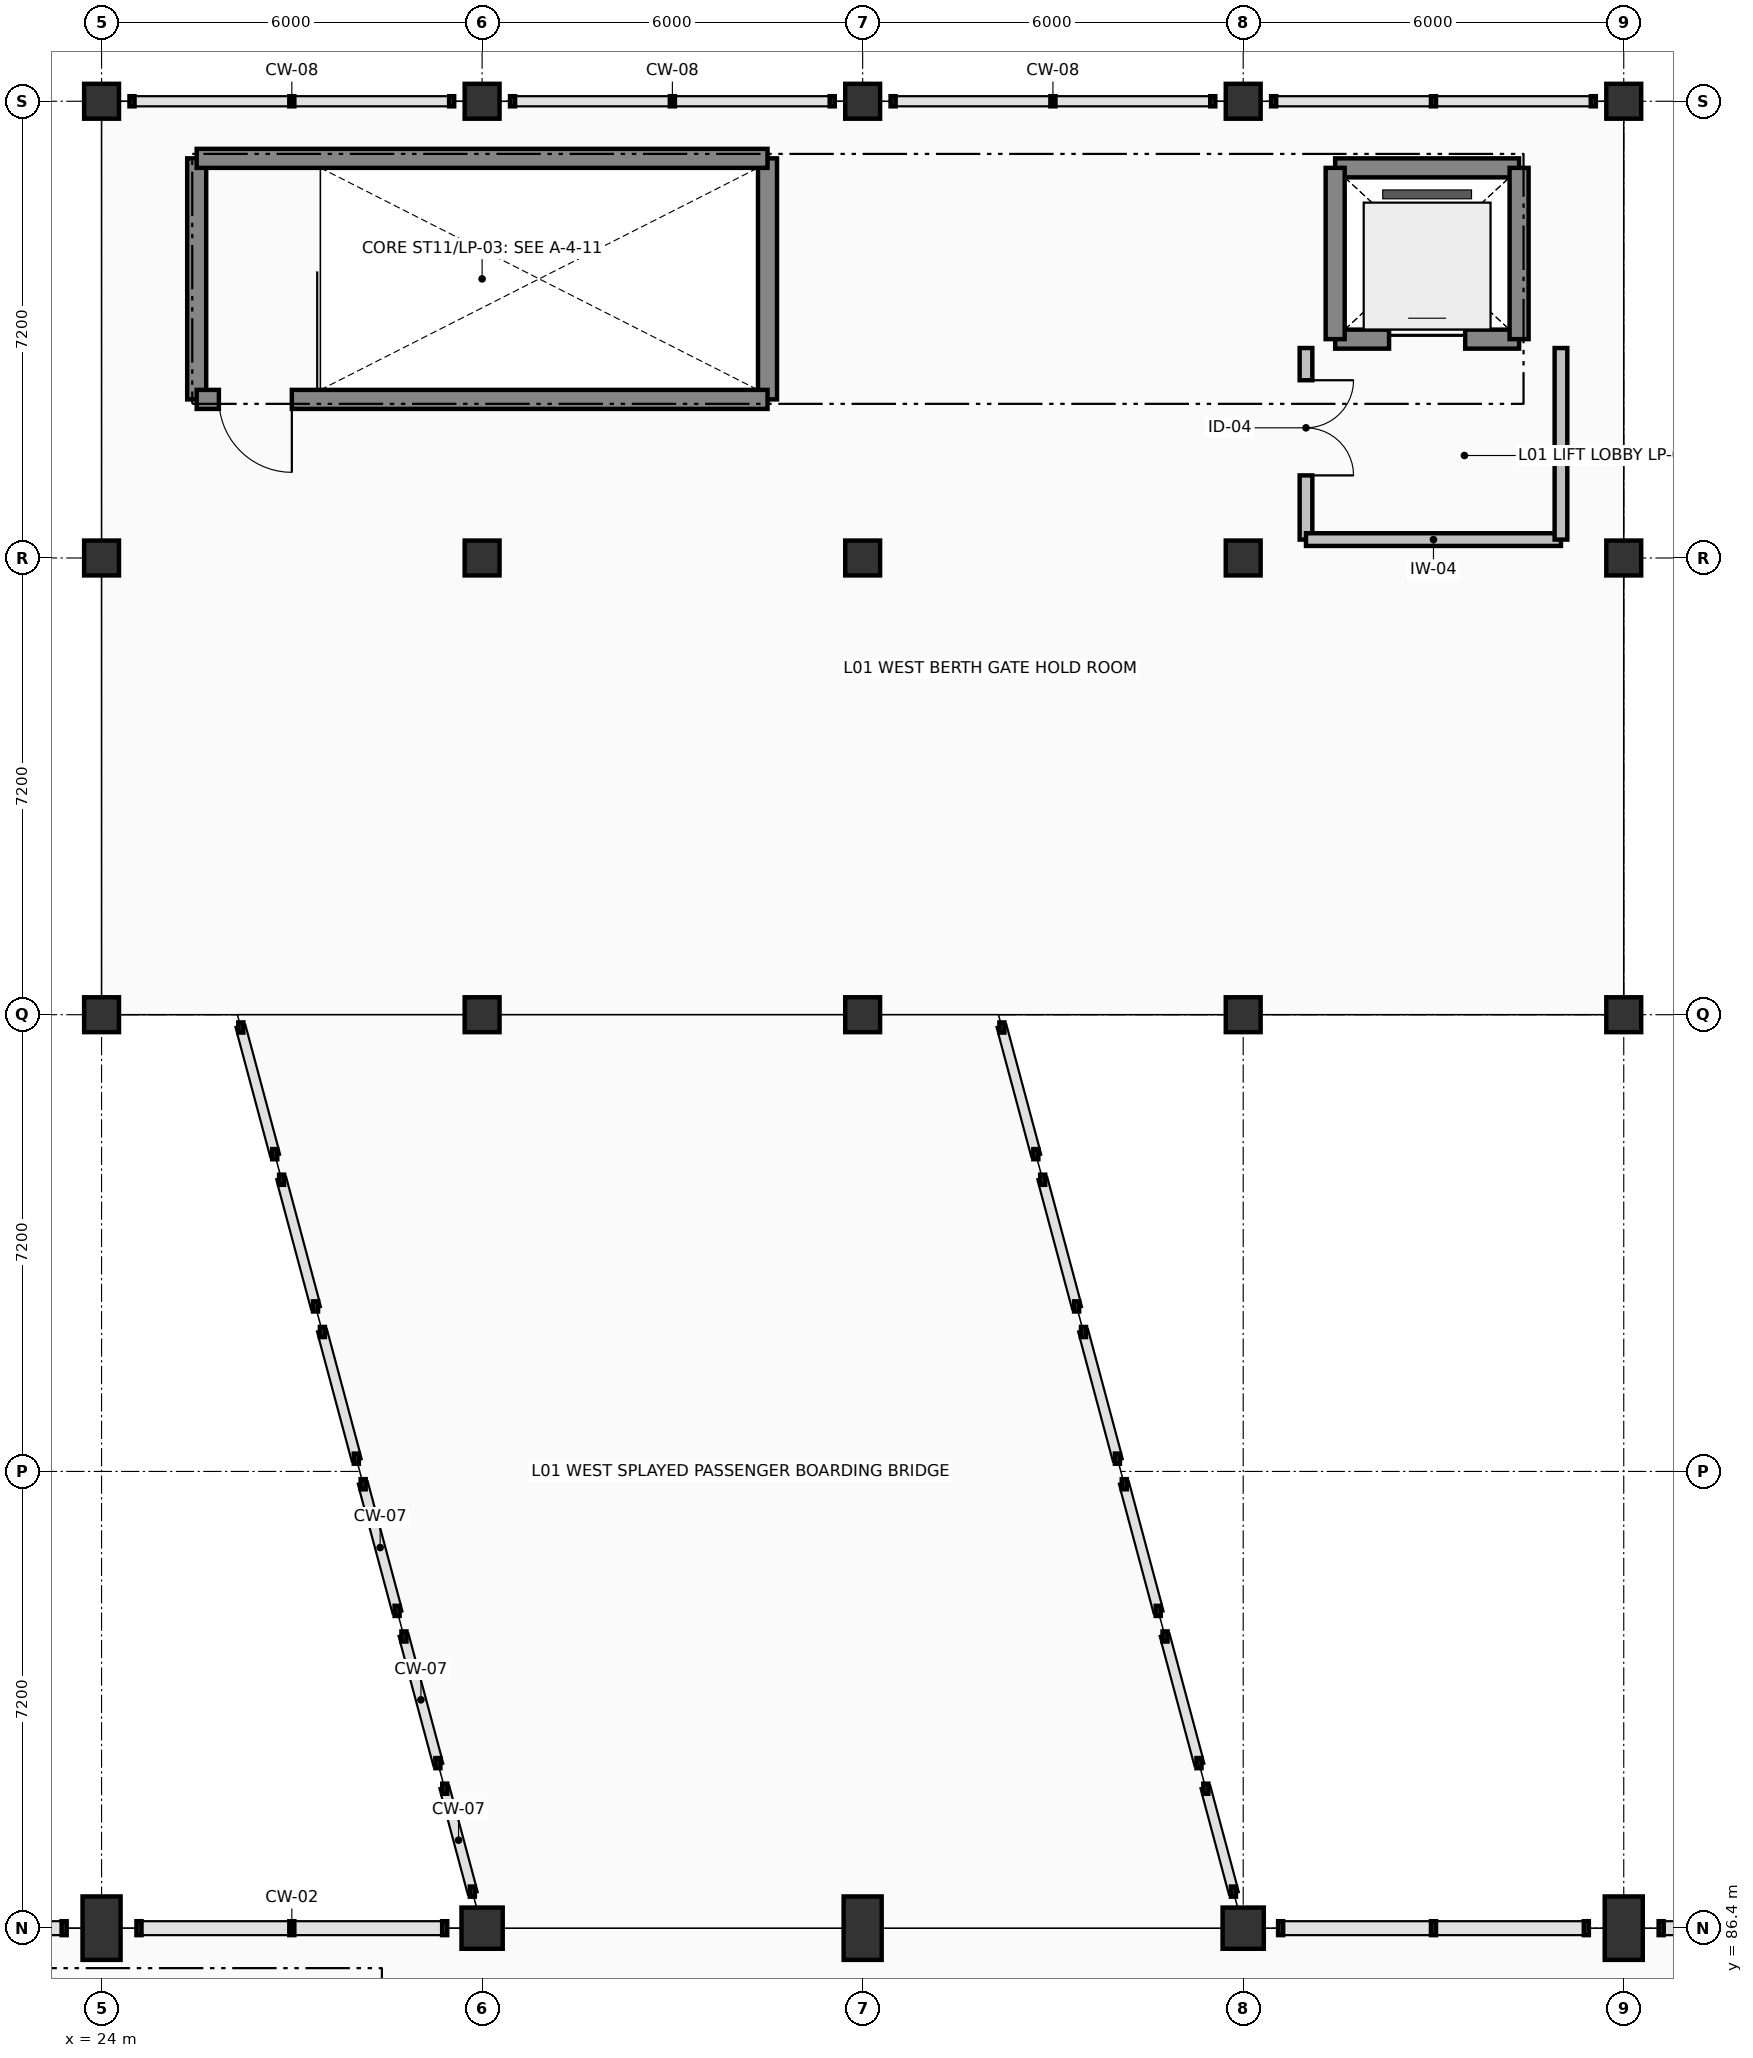
"""IFC4 building model, lengths in metres.
Left out: names, types, materials, properties, quantities, classifications, styles, units other than length and angle.
Written with IfcOpenShell. Run it as: python <this file> out.ifc"""

import sys

from ifc_helpers import new_model, si_unit, direction, frame, frame_2d, origin, origin_2d, place, context, subcontext, project, spatial, rectangle, extrude, element, fill, save


model = new_model("IFC4")
c1 = context("Model", 3, precision=1e-05, world=origin(), true_north=direction((0.0, 1.0)))
c2 = subcontext(c1, "Body", "Model", "MODEL_VIEW")
j1 = project(units=[si_unit("LENGTHUNIT", "METRE"), si_unit("PLANEANGLEUNIT", "RADIAN")], contexts=[c1])
p1 = place(None, origin())
s1 = spatial("IfcSite", under=j1, at=p1, CompositionType="ELEMENT")
p2 = place(p1, origin())
s2 = spatial("IfcBuilding", under=s1, at=p2, CompositionType="ELEMENT")
p3 = place(p2, frame((0.0, 0.0, 5.76)))
s3 = spatial("IfcBuildingStorey", under=s2, at=p3, CompositionType="ELEMENT", Elevation=5.76)
for number, where, z_axis, x_axis in (
    (1, (25.5, 110.5, 0.0), (0.0, 0.0, 1.0), (0.0, 1.0, 0.0)),
    (2, (34.5, 110.5, 0.0), (0.0, 0.0, 1.0), (0.0, 1.0, 0.0)),
):
    element("IfcWall", number, at=place(p3, frame(where, z_axis=z_axis, x_axis=x_axis)), inside=s3, PredefinedType="SHEAR", context=c2, shape_type="SweptSolid", body=[
        extrude(rectangle(XDim=3.8, YDim=0.3, at=frame_2d((1.9, 0.0))), origin(), (0.0, 0.0, 1.0), 3.78),
    ])
p4 = place(p3, frame((24.0, 86.4, 0.0), z_axis=(0.0, 0.0, 1.0), x_axis=(1.0, 0.0, 0.0)))
e3 = element("IfcColumn", 3, at=p4, inside=s3, PredefinedType="COLUMN", context=c2, shape_type="SweptSolid", body=[
    extrude(rectangle(XDim=0.6, YDim=1.0, at=origin_2d()), origin(), (0.0, 0.0, 1.0), 5.08),
])
p5 = place(p3, frame((30.0, 86.4, 0.0), z_axis=(0.0, 0.0, 1.0), x_axis=(1.0, 0.0, 0.0)))
e4 = element("IfcColumn", 4, at=p5, inside=s3, PredefinedType="COLUMN", context=c2, shape_type="SweptSolid", body=[
    extrude(rectangle(XDim=0.65, YDim=0.65, at=origin_2d()), origin(), (0.0, 0.0, 1.0), 5.08),
])
p6 = place(p3, frame((36.0, 86.4, 0.0), z_axis=(0.0, 0.0, 1.0), x_axis=(1.0, 0.0, 0.0)))
e5 = element("IfcColumn", 5, at=p6, inside=s3, PredefinedType="COLUMN", context=c2, shape_type="SweptSolid", body=[
    extrude(rectangle(XDim=0.6, YDim=1.0, at=origin_2d()), origin(), (0.0, 0.0, 1.0), 5.08),
])
p7 = place(p3, frame((42.0, 86.4, 0.0), z_axis=(0.0, 0.0, 1.0), x_axis=(1.0, 0.0, 0.0)))
e6 = element("IfcColumn", 6, at=p7, inside=s3, PredefinedType="COLUMN", context=c2, shape_type="SweptSolid", body=[
    extrude(rectangle(XDim=0.65, YDim=0.65, at=origin_2d()), origin(), (0.0, 0.0, 1.0), 5.08),
])
p8 = place(p3, frame((48.0, 86.4, 0.0), z_axis=(0.0, 0.0, 1.0), x_axis=(1.0, 0.0, 0.0)))
e7 = element("IfcColumn", 7, at=p8, inside=s3, PredefinedType="COLUMN", context=c2, shape_type="SweptSolid", body=[
    extrude(rectangle(XDim=0.6, YDim=1.0, at=origin_2d()), origin(), (0.0, 0.0, 1.0), 5.08),
])
for number, where, z_axis, x_axis in (
    (8, (24.0, 100.8, 0.0), (0.0, 0.0, 1.0), (1.0, 0.0, 0.0)),
    (9, (24.0, 108.0, 0.0), (0.0, 0.0, 1.0), (1.0, 0.0, 0.0)),
    (10, (24.0, 115.2, 0.0), (0.0, 0.0, 1.0), (1.0, 0.0, 0.0)),
    (11, (30.0, 100.8, 0.0), (0.0, 0.0, 1.0), (1.0, 0.0, 0.0)),
    (12, (30.0, 108.0, 0.0), (0.0, 0.0, 1.0), (1.0, 0.0, 0.0)),
    (13, (30.0, 115.2, 0.0), (0.0, 0.0, 1.0), (1.0, 0.0, 0.0)),
    (14, (36.0, 100.8, 0.0), (0.0, 0.0, 1.0), (1.0, 0.0, 0.0)),
    (15, (36.0, 108.0, 0.0), (0.0, 0.0, 1.0), (1.0, 0.0, 0.0)),
    (16, (36.0, 115.2, 0.0), (0.0, 0.0, 1.0), (1.0, 0.0, 0.0)),
    (17, (42.0, 100.8, 0.0), (0.0, 0.0, 1.0), (1.0, 0.0, 0.0)),
    (18, (42.0, 108.0, 0.0), (0.0, 0.0, 1.0), (1.0, 0.0, 0.0)),
    (19, (42.0, 115.2, 0.0), (0.0, 0.0, 1.0), (1.0, 0.0, 0.0)),
    (20, (48.0, 100.8, 0.0), (0.0, 0.0, 1.0), (1.0, 0.0, 0.0)),
    (21, (48.0, 108.0, 0.0), (0.0, 0.0, 1.0), (1.0, 0.0, 0.0)),
    (22, (48.0, 115.2, 0.0), (0.0, 0.0, 1.0), (1.0, 0.0, 0.0)),
):
    element("IfcColumn", number, at=place(p3, frame(where, z_axis=z_axis, x_axis=x_axis)), inside=s3, PredefinedType="COLUMN", context=c2, shape_type="SweptSolid", body=[
        extrude(rectangle(XDim=0.55, YDim=0.55, at=origin_2d()), origin(), (0.0, 0.0, 1.0), 4.08),
    ])
p9 = place(p3, frame((25.5, 114.3, 0.0), z_axis=(0.0, 0.0, 1.0), x_axis=(1.0, 0.0, 0.0)))
e23 = element("IfcWall", 23, at=p9, inside=s3, PredefinedType="SHEAR", context=c2, shape_type="SweptSolid", body=[
    extrude(rectangle(XDim=9.0, YDim=0.3, at=frame_2d((4.5, 0.0))), origin(), (0.0, 0.0, 1.0), 3.78),
])
p10 = place(p3, frame((25.5, 110.5, 0.0), z_axis=(0.0, 0.0, 1.0), x_axis=(1.0, 0.0, 0.0)))
e24 = element("IfcWall", 24, at=p10, inside=s3, PredefinedType="SHEAR", context=c2, shape_type="SweptSolid", body=[
    extrude(rectangle(XDim=9.0, YDim=0.3, at=frame_2d((4.5, 0.0))), origin(), (0.0, 0.0, 1.0), 3.78),
])
p11 = place(p10, frame((0.35, 0.0, 0.0)))
e25 = element("IfcOpeningElement", 25, at=p11, cuts=e24, PredefinedType="OPENING", context=c2, shape_type="SweptSolid", body=[
    extrude(rectangle(XDim=1.15, YDim=2.15, at=frame_2d((0.575, 1.075))), frame((0.0, 0.16, 0.0), z_axis=(0.0, -1.0, 0.0), x_axis=(1.0, 0.0, 0.0)), (0.0, 0.0, 1.0), 0.32),
])
p12 = place(p3, frame((43.45, 111.45, 0.0), z_axis=(0.0, 0.0, 1.0), x_axis=(1.0, 0.0, 0.0)))
e26 = element("IfcWall", 26, at=p12, inside=s3, PredefinedType="SHEAR", context=c2, shape_type="SweptSolid", body=[
    extrude(rectangle(XDim=2.9, YDim=0.3, at=frame_2d((1.45, 0.0))), origin(), (0.0, 0.0, 1.0), 3.78),
])
p13 = place(p12, frame((0.85, 0.0, 0.0)))
e27 = element("IfcOpeningElement", 27, at=p13, cuts=e26, PredefinedType="OPENING", context=c2, shape_type="SweptSolid", body=[
    extrude(rectangle(XDim=1.2, YDim=2.15, at=frame_2d((0.6, 1.075))), frame((0.0, 0.16, 0.0), z_axis=(0.0, -1.0, 0.0), x_axis=(1.0, 0.0, 0.0)), (0.0, 0.0, 1.0), 0.32),
])
p14 = place(p3, frame((43.45, 114.15, 0.0), z_axis=(0.0, 0.0, 1.0), x_axis=(1.0, 0.0, 0.0)))
e28 = element("IfcWall", 28, at=p14, inside=s3, PredefinedType="SHEAR", context=c2, shape_type="SweptSolid", body=[
    extrude(rectangle(XDim=2.9, YDim=0.3, at=frame_2d((1.45, 0.0))), origin(), (0.0, 0.0, 1.0), 3.78),
])
for number, where, z_axis, x_axis in (
    (29, (43.45, 111.45, 0.0), (0.0, 0.0, 1.0), (0.0, 1.0, 0.0)),
    (30, (46.35, 111.45, 0.0), (0.0, 0.0, 1.0), (0.0, 1.0, 0.0)),
):
    element("IfcWall", number, at=place(p3, frame(where, z_axis=z_axis, x_axis=x_axis)), inside=s3, PredefinedType="SHEAR", context=c2, shape_type="SweptSolid", body=[
        extrude(rectangle(XDim=2.7, YDim=0.3, at=frame_2d((1.35, 0.0))), origin(), (0.0, 0.0, 1.0), 3.78),
    ])
p15 = place(p3, frame((42.99, 111.31, 0.0), z_axis=(0.0, 0.0, 1.0), x_axis=(0.0, -1.0, 0.0)))
e31 = element("IfcWall", 31, at=p15, inside=s3, PredefinedType="PARTITIONING", context=c2, shape_type="SweptSolid", body=[
    extrude(rectangle(XDim=3.02, YDim=0.2, at=frame_2d((1.51, 0.0))), origin(), (0.0, 0.0, 1.0), 3.82),
])
p16 = place(p15, frame((0.508, 0.0, 0.0)))
e32 = element("IfcOpeningElement", 32, at=p16, cuts=e31, PredefinedType="OPENING", context=c2, shape_type="SweptSolid", body=[
    extrude(rectangle(XDim=1.5, YDim=2.2, at=frame_2d((0.75, 1.1))), frame((0.0, 0.11, 0.0), z_axis=(0.0, -1.0, 0.0), x_axis=(1.0, 0.0, 0.0)), (0.0, 0.0, 1.0), 0.22),
])
p17 = place(p3, frame((42.99, 108.29, 0.0), z_axis=(0.0, 0.0, 1.0), x_axis=(1.0, 0.0, 0.0)))
e33 = element("IfcWall", 33, at=p17, inside=s3, PredefinedType="PARTITIONING", context=c2, shape_type="SweptSolid", body=[
    extrude(rectangle(XDim=4.02, YDim=0.2, at=frame_2d((2.01, 0.0))), origin(), (0.0, 0.0, 1.0), 3.18),
])
p18 = place(p3, frame((47.01, 108.29, 0.0), z_axis=(0.0, 0.0, 1.0), x_axis=(0.0, 1.0, 0.0)))
e34 = element("IfcWall", 34, at=p18, inside=s3, PredefinedType="PARTITIONING", context=c2, shape_type="SweptSolid", body=[
    extrude(rectangle(XDim=3.02, YDim=0.2, at=frame_2d((1.51, 0.0))), origin(), (0.0, 0.0, 1.0), 3.82),
])
p19 = place(p11, frame((1.15, 0.0, 0.0), z_axis=(0.0, 0.0, 1.0), x_axis=(-1.0, 0.0, 0.0)))
e35 = element("IfcDoor", 35, at=p19, inside=s3, OperationType="SINGLE_SWING_LEFT", PredefinedType="DOOR", context=c2, shape_type="SweptSolid", body=[
    extrude(rectangle(XDim=1.15, YDim=2.15, at=frame_2d((0.575, 1.075))), frame((0.0, 0.025, 0.0), z_axis=(0.0, -1.0, 0.0), x_axis=(1.0, 0.0, 0.0)), (0.0, 0.0, 1.0), 0.05),
])
fill(e25, e35)
p20 = place(p13, origin())
e36 = element("IfcDoor", 36, at=p20, inside=s3, OperationType="SLIDING_TO_LEFT", PredefinedType="DOOR", context=c2, shape_type="SweptSolid", body=[
    extrude(rectangle(XDim=1.2, YDim=2.15, at=frame_2d((0.6, 1.075))), frame((0.0, 0.025, 0.0), z_axis=(0.0, -1.0, 0.0), x_axis=(1.0, 0.0, 0.0)), (0.0, 0.0, 1.0), 0.05),
])
fill(e27, e36)
p21 = place(p16, origin())
e37 = element("IfcDoor", 37, at=p21, inside=s3, OperationType="DOUBLE_SWING_LEFT", PredefinedType="DOOR", context=c2, shape_type="SweptSolid", body=[
    extrude(rectangle(XDim=1.5, YDim=2.2, at=frame_2d((0.75, 1.1))), frame((0.0, 0.025, 0.0), z_axis=(0.0, -1.0, 0.0), x_axis=(1.0, 0.0, 0.0)), (0.0, 0.0, 1.0), 0.05),
])
fill(e32, e37)
save(model, sys.argv[1])
